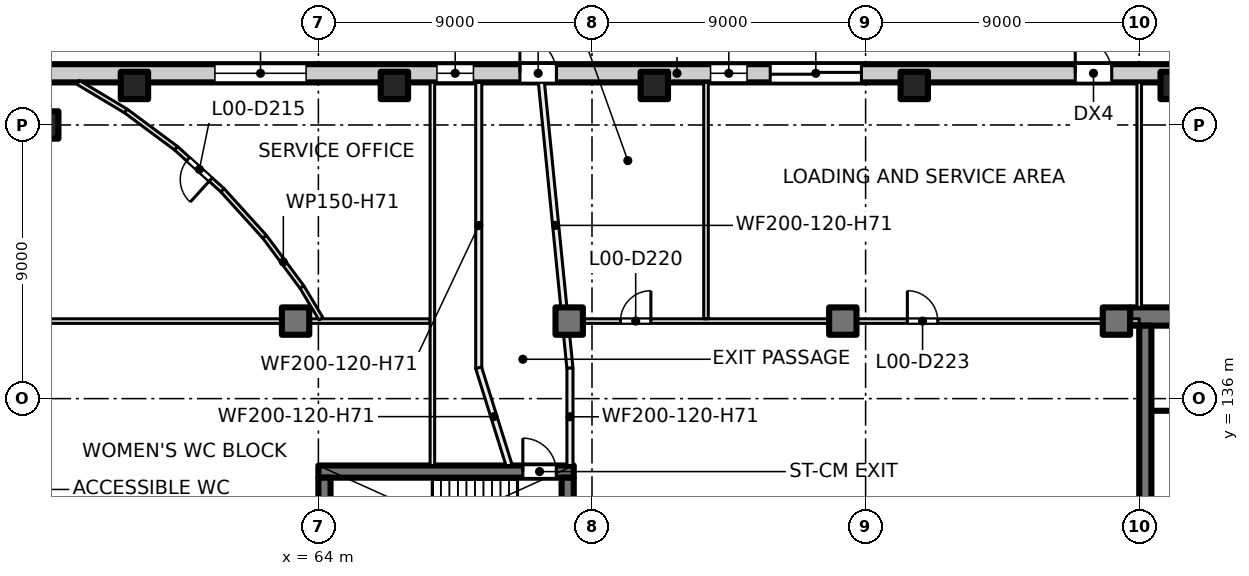
"""IFC4 building model, lengths in metres.
Left out: names, types, materials, properties, quantities, classifications, styles, units other than length and angle.
Written with IfcOpenShell. Run it as: python <this file> out.ifc"""

import sys

from ifc_helpers import new_model, si_unit, direction, frame, frame_2d, origin, origin_2d, place, context, subcontext, project, spatial, rectangle, extrude, element, fill, save


model = new_model("IFC4")
c1 = context("Model", 3, precision=1e-05, world=origin(), true_north=direction((0.0, 1.0)))
c2 = subcontext(c1, "Body", "Model", "MODEL_VIEW")
j1 = project(units=[si_unit("LENGTHUNIT", "METRE"), si_unit("PLANEANGLEUNIT", "RADIAN")], contexts=[c1])
p1 = place(None, origin())
s1 = spatial("IfcSite", under=j1, at=p1, CompositionType="ELEMENT")
p2 = place(p1, origin())
s2 = spatial("IfcBuilding", under=s1, at=p2, CompositionType="ELEMENT")
p3 = place(p2, origin())
s3 = spatial("IfcBuildingStorey", under=s2, at=p3, CompositionType="ELEMENT", Elevation=0.0)
for number, where, z_axis, x_axis in (
    (1, (55.0, 145.0, 0.0), (0.0, 0.0, 1.0), (1.0, 0.0, 0.0)),
    (2, (57.95, 146.3, 0.0), (0.0, 0.0, 1.0), (1.0, 0.0, 0.0)),
    (3, (66.5, 146.3, 0.0), (0.0, 0.0, 1.0), (1.0, 0.0, 0.0)),
    (4, (75.05, 146.3, 0.0), (0.0, 0.0, 1.0), (1.0, 0.0, 0.0)),
    (5, (83.6, 146.3, 0.0), (0.0, 0.0, 1.0), (1.0, 0.0, 0.0)),
    (6, (92.15, 146.3, 0.0), (0.0, 0.0, 1.0), (1.0, 0.0, 0.0)),
    (7, (63.25, 138.55, 0.0), (0.0, 0.0, 1.0), (1.0, 0.0, 0.0)),
    (8, (72.25, 138.55, 0.0), (0.0, 0.0, 1.0), (1.0, 0.0, 0.0)),
    (9, (81.25, 138.55, 0.0), (0.0, 0.0, 1.0), (1.0, 0.0, 0.0)),
    (10, (90.25, 138.55, 0.0), (0.0, 0.0, 1.0), (1.0, 0.0, 0.0)),
):
    element("IfcColumn", number, at=place(p3, frame(where, z_axis=z_axis, x_axis=x_axis)), inside=s3, PredefinedType="COLUMN", context=c2, shape_type="SweptSolid", body=[
        extrude(rectangle(XDim=0.9, YDim=0.9, at=origin_2d()), origin(), (0.0, 0.0, 1.0), 7.5),
    ])
p4 = place(p3, frame((99.6, 138.7, 0.0), z_axis=(0.0, 0.0, 1.0), x_axis=(-1.0, 0.0, 0.0)))
e11 = element("IfcWall", 11, at=p4, inside=s3, PredefinedType="SHEAR", context=c2, shape_type="SweptSolid", body=[
    extrude(rectangle(XDim=8.9, YDim=0.6, at=frame_2d((4.45, 0.0))), origin(), (0.0, 0.0, 1.0), 7.5),
])
p5 = place(p3, frame((91.2, 138.4, 0.0), z_axis=(0.0, 0.0, 1.0), x_axis=(0.0, -1.0, 0.0)))
e12 = element("IfcWall", 12, at=p5, inside=s3, PredefinedType="SHEAR", context=c2, shape_type="SweptSolid", body=[
    extrude(rectangle(XDim=8.6, YDim=0.4, at=frame_2d((4.3, 0.0))), origin(), (0.0, 0.0, 1.0), 7.5),
])
p6 = place(p3, frame((64.0, 133.6, 0.0), z_axis=(0.0, 0.0, 1.0), x_axis=(1.0, 0.0, 0.0)))
e13 = element("IfcWall", 13, at=p6, inside=s3, PredefinedType="SHEAR", context=c2, shape_type="SweptSolid", body=[
    extrude(rectangle(XDim=8.4, YDim=0.4, at=frame_2d((4.2, 0.0))), origin(), (0.0, 0.0, 1.0), 7.5),
])
p7 = place(p6, frame((6.725, 0.0, 0.0)))
e14 = element("IfcOpeningElement", 14, at=p7, cuts=e13, PredefinedType="OPENING", context=c2, shape_type="SweptSolid", body=[
    extrude(rectangle(XDim=1.1, YDim=2.1, at=frame_2d((0.55, 1.05))), frame((0.0, 0.21, 0.0), z_axis=(0.0, -1.0, 0.0), x_axis=(1.0, 0.0, 0.0)), (0.0, 0.0, 1.0), 0.42),
])
for number, where, z_axis, x_axis in (
    (15, (64.2, 130.4, 0.0), (0.0, 0.0, 1.0), (0.0, 1.0, 0.0)),
    (16, (72.2, 130.4, 0.0), (0.0, 0.0, 1.0), (0.0, 1.0, 0.0)),
):
    element("IfcWall", number, at=place(p3, frame(where, z_axis=z_axis, x_axis=x_axis)), inside=s3, PredefinedType="SHEAR", context=c2, shape_type="SweptSolid", body=[
        extrude(rectangle(XDim=3.0, YDim=0.4, at=frame_2d((1.5, 0.0))), origin(), (0.0, 0.0, 1.0), 7.5),
    ])
p8 = place(p3, frame((46.114, 146.7, 0.0), z_axis=(0.0, 0.0, 1.0), x_axis=(1.0, 0.0, 0.0)))
e17 = element("IfcWall", 17, at=p8, inside=s3, PredefinedType="SOLIDWALL", context=c2, shape_type="SweptSolid", body=[
    extrude(rectangle(XDim=59.364, YDim=0.6, at=frame_2d((29.682, 0.0))), origin(), (0.0, 0.0, 1.0), 7.1),
])
p9 = place(p8, frame((5.35, 0.0, 0.9)))
e18 = element("IfcOpeningElement", 18, at=p9, cuts=e17, PredefinedType="OPENING", context=c2, shape_type="SweptSolid", body=[
    extrude(rectangle(XDim=3.0, YDim=4.2, at=frame_2d((1.5, 2.1))), frame((0.0, 0.31, 0.0), z_axis=(0.0, -1.0, 0.0), x_axis=(1.0, 0.0, 0.0)), (0.0, 0.0, 1.0), 0.62),
])
p10 = place(p8, frame((14.483, 0.0, 0.9)))
e19 = element("IfcOpeningElement", 19, at=p10, cuts=e17, PredefinedType="OPENING", context=c2, shape_type="SweptSolid", body=[
    extrude(rectangle(XDim=3.0, YDim=4.2, at=frame_2d((1.5, 2.1))), frame((0.0, 0.31, 0.0), z_axis=(0.0, -1.0, 0.0), x_axis=(1.0, 0.0, 0.0)), (0.0, 0.0, 1.0), 0.62),
])
p11 = place(p8, frame((21.786, 0.0, 0.9)))
e20 = element("IfcOpeningElement", 20, at=p11, cuts=e17, PredefinedType="OPENING", context=c2, shape_type="SweptSolid", body=[
    extrude(rectangle(XDim=1.2, YDim=4.2, at=frame_2d((0.6, 2.1))), frame((0.0, 0.31, 0.0), z_axis=(0.0, -1.0, 0.0), x_axis=(1.0, 0.0, 0.0)), (0.0, 0.0, 1.0), 0.62),
])
p12 = place(p8, frame((24.516, 0.0, 0.0)))
e21 = element("IfcOpeningElement", 21, at=p12, cuts=e17, PredefinedType="OPENING", context=c2, shape_type="SweptSolid", body=[
    extrude(rectangle(XDim=1.2, YDim=2.4, at=frame_2d((0.6, 1.2))), frame((0.0, 0.31, 0.0), z_axis=(0.0, -1.0, 0.0), x_axis=(1.0, 0.0, 0.0)), (0.0, 0.0, 1.0), 0.62),
])
p13 = place(p8, frame((30.786, 0.0, 0.9)))
e22 = element("IfcOpeningElement", 22, at=p13, cuts=e17, PredefinedType="OPENING", context=c2, shape_type="SweptSolid", body=[
    extrude(rectangle(XDim=1.2, YDim=4.2, at=frame_2d((0.6, 2.1))), frame((0.0, 0.31, 0.0), z_axis=(0.0, -1.0, 0.0), x_axis=(1.0, 0.0, 0.0)), (0.0, 0.0, 1.0), 0.62),
])
p14 = place(p8, frame((32.749, 0.0, 0.0)))
e23 = element("IfcOpeningElement", 23, at=p14, cuts=e17, PredefinedType="OPENING", context=c2, shape_type="SweptSolid", body=[
    extrude(rectangle(XDim=3.0, YDim=3.0, at=frame_2d((1.5, 1.5))), frame((0.0, 0.31, 0.0), z_axis=(0.0, -1.0, 0.0), x_axis=(1.0, 0.0, 0.0)), (0.0, 0.0, 1.0), 0.62),
])
p15 = place(p8, frame((42.781, 0.0, 0.0)))
e24 = element("IfcOpeningElement", 24, at=p15, cuts=e17, PredefinedType="OPENING", context=c2, shape_type="SweptSolid", body=[
    extrude(rectangle(XDim=1.2, YDim=2.1, at=frame_2d((0.6, 1.05))), frame((0.0, 0.31, 0.0), z_axis=(0.0, -1.0, 0.0), x_axis=(1.0, 0.0, 0.0)), (0.0, 0.0, 1.0), 0.62),
])
p16 = place(p8, frame((46.748, 0.0, 0.9)))
e25 = element("IfcOpeningElement", 25, at=p16, cuts=e17, PredefinedType="OPENING", context=c2, shape_type="SweptSolid", body=[
    extrude(rectangle(XDim=3.0, YDim=4.2, at=frame_2d((1.5, 2.1))), frame((0.0, 0.31, 0.0), z_axis=(0.0, -1.0, 0.0), x_axis=(1.0, 0.0, 0.0)), (0.0, 0.0, 1.0), 0.62),
])
p17 = place(p8, frame((50.865, 0.0, 0.9)))
e26 = element("IfcOpeningElement", 26, at=p17, cuts=e17, PredefinedType="OPENING", context=c2, shape_type="SweptSolid", body=[
    extrude(rectangle(XDim=3.0, YDim=4.2, at=frame_2d((1.5, 2.1))), frame((0.0, 0.31, 0.0), z_axis=(0.0, -1.0, 0.0), x_axis=(1.0, 0.0, 0.0)), (0.0, 0.0, 1.0), 0.62),
])
p18 = place(p8, frame((56.481, 0.0, 0.0)))
e27 = element("IfcOpeningElement", 27, at=p18, cuts=e17, PredefinedType="OPENING", context=c2, shape_type="SweptSolid", body=[
    extrude(rectangle(XDim=1.2, YDim=2.4, at=frame_2d((0.6, 1.2))), frame((0.0, 0.31, 0.0), z_axis=(0.0, -1.0, 0.0), x_axis=(1.0, 0.0, 0.0)), (0.0, 0.0, 1.0), 0.62),
])
p19 = place(p3, frame((91.4, 135.6, 0.0), z_axis=(0.0, 0.0, 1.0), x_axis=(1.0, 0.0, 0.0)))
e28 = element("IfcWall", 28, at=p19, inside=s3, PredefinedType="PARTITIONING", context=c2, shape_type="SweptSolid", body=[
    extrude(rectangle(XDim=1.95, YDim=0.1, at=frame_2d((0.975, 0.0))), origin(), (0.0, 0.0, 1.0), 7.1),
])
p20 = place(p3, frame((54.325, 138.55, 0.0), z_axis=(0.0, 0.0, 1.0), x_axis=(1.0, 0.0, 0.0)))
e29 = element("IfcWall", 29, at=p20, inside=s3, PredefinedType="PARTITIONING", context=c2, shape_type="SweptSolid", body=[
    extrude(rectangle(XDim=13.35, YDim=0.15, at=frame_2d((6.675, 0.0))), origin(), (0.0, 0.0, 1.0), 7.1),
])
p21 = place(p3, frame((56.1, 146.4, 0.0), z_axis=(0.0, 0.0, 1.0), x_axis=(0.857728238456, -0.514103364076, 0.0)))
e30 = element("IfcWall", 30, at=p21, inside=s3, PredefinedType="PARTITIONING", context=c2, shape_type="SweptSolid", body=[
    extrude(rectangle(XDim=1.83, YDim=0.15, at=frame_2d((0.915, 0.0))), origin(), (0.0, 0.0, 1.0), 7.1),
])
p22 = place(p3, frame((57.664, 145.463, 0.0), z_axis=(0.0, 0.0, 1.0), x_axis=(0.80317638599, -0.595741297031, 0.0)))
e31 = element("IfcWall", 31, at=p22, inside=s3, PredefinedType="PARTITIONING", context=c2, shape_type="SweptSolid", body=[
    extrude(rectangle(XDim=2.068, YDim=0.15, at=frame_2d((1.034, 0.0))), origin(), (0.0, 0.0, 1.0), 7.1),
])
p23 = place(p3, frame((59.319, 144.235, 0.0), z_axis=(0.0, 0.0, 1.0), x_axis=(0.741242052621, -0.671237826278, 0.0)))
e32 = element("IfcWall", 32, at=p23, inside=s3, PredefinedType="PARTITIONING", context=c2, shape_type="SweptSolid", body=[
    extrude(rectangle(XDim=2.068, YDim=0.15, at=frame_2d((1.034, 0.0))), origin(), (0.0, 0.0, 1.0), 7.1),
])
p24 = place(p23, frame((0.534, 0.0, 0.0)))
e33 = element("IfcOpeningElement", 33, at=p24, cuts=e32, PredefinedType="OPENING", context=c2, shape_type="SweptSolid", body=[
    extrude(rectangle(XDim=1.0, YDim=2.1, at=frame_2d((0.5, 1.05))), frame((0.0, 0.085, 0.0), z_axis=(0.0, -1.0, 0.0), x_axis=(1.0, 0.0, 0.0)), (0.0, 0.0, 1.0), 0.17),
])
p25 = place(p3, frame((60.847, 142.852, 0.0), z_axis=(0.0, 0.0, 1.0), x_axis=(0.671237826278, -0.741242052621, 0.0)))
e34 = element("IfcWall", 34, at=p25, inside=s3, PredefinedType="PARTITIONING", context=c2, shape_type="SweptSolid", body=[
    extrude(rectangle(XDim=2.068, YDim=0.15, at=frame_2d((1.034, 0.0))), origin(), (0.0, 0.0, 1.0), 7.1),
])
p26 = place(p3, frame((62.231, 141.325, 0.0), z_axis=(0.0, 0.0, 1.0), x_axis=(0.595741297031, -0.80317638599, 0.0)))
e35 = element("IfcWall", 35, at=p26, inside=s3, PredefinedType="PARTITIONING", context=c2, shape_type="SweptSolid", body=[
    extrude(rectangle(XDim=2.068, YDim=0.15, at=frame_2d((1.034, 0.0))), origin(), (0.0, 0.0, 1.0), 7.1),
])
p27 = place(p3, frame((63.459, 139.67, 0.0), z_axis=(0.0, 0.0, 1.0), x_axis=(0.513906129706, -0.857846425563, 0.0)))
e36 = element("IfcWall", 36, at=p27, inside=s3, PredefinedType="PARTITIONING", context=c2, shape_type="SweptSolid", body=[
    extrude(rectangle(XDim=1.218, YDim=0.15, at=frame_2d((0.609, 0.0))), origin(), (0.0, 0.0, 1.0), 7.1),
])
p28 = place(p3, frame((67.75, 133.8, 0.0), z_axis=(0.0, 0.0, 1.0), x_axis=(0.0, 1.0, 0.0)))
e37 = element("IfcWall", 37, at=p28, inside=s3, PredefinedType="PARTITIONING", context=c2, shape_type="SweptSolid", body=[
    extrude(rectangle(XDim=12.6, YDim=0.15, at=frame_2d((6.3, 0.0))), origin(), (0.0, 0.0, 1.0), 7.1),
])
p29 = place(p3, frame((69.275, 136.985, 0.0), z_axis=(0.0, 0.0, 1.0), x_axis=(0.0, 1.0, 0.0)))
e38 = element("IfcWall", 38, at=p29, inside=s3, PredefinedType="PARTITIONING", context=c2, shape_type="SweptSolid", body=[
    extrude(rectangle(XDim=9.415, YDim=0.2, at=frame_2d((4.708, 0.0))), origin(), (0.0, 0.0, 1.0), 7.1),
])
p30 = place(p3, frame((69.27, 137.015, 0.0), z_axis=(0.0, 0.0, 1.0), x_axis=(0.298341026978, -0.954459339952, 0.0)))
e39 = element("IfcWall", 39, at=p30, inside=s3, PredefinedType="PARTITIONING", context=c2, shape_type="SweptSolid", body=[
    extrude(rectangle(XDim=3.368, YDim=0.2, at=frame_2d((1.684, 0.0))), origin(), (0.0, 0.0, 1.0), 7.1),
])
p31 = place(p3, frame((71.335, 146.4, 0.0), z_axis=(0.0, 0.0, 1.0), x_axis=(0.09944745439, -0.995042815066, 0.0)))
e40 = element("IfcWall", 40, at=p31, inside=s3, PredefinedType="PARTITIONING", context=c2, shape_type="SweptSolid", body=[
    extrude(rectangle(XDim=9.452, YDim=0.2, at=frame_2d((4.726, 0.0))), origin(), (0.0, 0.0, 1.0), 7.1),
])
p32 = place(p3, frame((72.22, 138.55, 0.0), z_axis=(0.0, 0.0, 1.0), x_axis=(1.0, 0.0, 0.0)))
e41 = element("IfcWall", 41, at=p32, inside=s3, PredefinedType="PARTITIONING", context=c2, shape_type="SweptSolid", body=[
    extrude(rectangle(XDim=18.78, YDim=0.15, at=frame_2d((9.39, 0.0))), origin(), (0.0, 0.0, 1.0), 7.1),
])
p33 = place(p32, frame((1.717, 0.0, 0.0)))
e42 = element("IfcOpeningElement", 42, at=p33, cuts=e41, PredefinedType="OPENING", context=c2, shape_type="SweptSolid", body=[
    extrude(rectangle(XDim=1.0, YDim=2.1, at=frame_2d((0.5, 1.05))), frame((0.0, 0.085, 0.0), z_axis=(0.0, -1.0, 0.0), x_axis=(1.0, 0.0, 0.0)), (0.0, 0.0, 1.0), 0.17),
])
p34 = place(p32, frame((11.153, 0.0, 0.0)))
e43 = element("IfcOpeningElement", 43, at=p34, cuts=e41, PredefinedType="OPENING", context=c2, shape_type="SweptSolid", body=[
    extrude(rectangle(XDim=1.0, YDim=2.1, at=frame_2d((0.5, 1.05))), frame((0.0, 0.085, 0.0), z_axis=(0.0, -1.0, 0.0), x_axis=(1.0, 0.0, 0.0)), (0.0, 0.0, 1.0), 0.17),
])
p35 = place(p3, frame((72.275, 133.8, 0.0), z_axis=(0.0, 0.0, 1.0), x_axis=(0.0, 1.0, 0.0)))
e44 = element("IfcWall", 44, at=p35, inside=s3, PredefinedType="PARTITIONING", context=c2, shape_type="SweptSolid", body=[
    extrude(rectangle(XDim=3.205, YDim=0.2, at=frame_2d((1.603, 0.0))), origin(), (0.0, 0.0, 1.0), 7.1),
])
p36 = place(p3, frame((76.75, 138.625, 0.0), z_axis=(0.0, 0.0, 1.0), x_axis=(0.0, 1.0, 0.0)))
e45 = element("IfcWall", 45, at=p36, inside=s3, PredefinedType="PARTITIONING", context=c2, shape_type="SweptSolid", body=[
    extrude(rectangle(XDim=7.775, YDim=0.15, at=frame_2d((3.887, 0.0))), origin(), (0.0, 0.0, 1.0), 7.1),
])
p37 = place(p3, frame((91.0, 139.0, 0.0), z_axis=(0.0, 0.0, 1.0), x_axis=(0.0, 1.0, 0.0)))
e46 = element("IfcWall", 46, at=p37, inside=s3, PredefinedType="PARTITIONING", context=c2, shape_type="SweptSolid", body=[
    extrude(rectangle(XDim=7.4, YDim=0.15, at=frame_2d((3.7, 0.0))), origin(), (0.0, 0.0, 1.0), 7.1),
])
p38 = place(p10, origin())
e47 = element("IfcWindow", 47, at=p38, inside=s3, PartitioningType="SINGLE_PANEL", PredefinedType="WINDOW", context=c2, shape_type="SweptSolid", body=[
    extrude(rectangle(XDim=3.0, YDim=4.2, at=frame_2d((1.5, 2.1))), frame((0.0, 0.03, 0.0), z_axis=(0.0, -1.0, 0.0), x_axis=(1.0, 0.0, 0.0)), (0.0, 0.0, 1.0), 0.06),
])
fill(e19, e47)
p39 = place(p11, origin())
e48 = element("IfcWindow", 48, at=p39, inside=s3, PartitioningType="SINGLE_PANEL", PredefinedType="WINDOW", context=c2, shape_type="SweptSolid", body=[
    extrude(rectangle(XDim=1.2, YDim=4.2, at=frame_2d((0.6, 2.1))), frame((0.0, 0.03, 0.0), z_axis=(0.0, -1.0, 0.0), x_axis=(1.0, 0.0, 0.0)), (0.0, 0.0, 1.0), 0.06),
])
fill(e20, e48)
p40 = place(p12, origin())
e49 = element("IfcDoor", 49, at=p40, inside=s3, OperationType="SINGLE_SWING_LEFT", PredefinedType="DOOR", context=c2, shape_type="SweptSolid", body=[
    extrude(rectangle(XDim=1.2, YDim=2.4, at=frame_2d((0.6, 1.2))), frame((0.0, 0.025, 0.0), z_axis=(0.0, -1.0, 0.0), x_axis=(1.0, 0.0, 0.0)), (0.0, 0.0, 1.0), 0.05),
])
fill(e21, e49)
p41 = place(p13, origin())
e50 = element("IfcWindow", 50, at=p41, inside=s3, PartitioningType="SINGLE_PANEL", PredefinedType="WINDOW", context=c2, shape_type="SweptSolid", body=[
    extrude(rectangle(XDim=1.2, YDim=4.2, at=frame_2d((0.6, 2.1))), frame((0.0, 0.03, 0.0), z_axis=(0.0, -1.0, 0.0), x_axis=(1.0, 0.0, 0.0)), (0.0, 0.0, 1.0), 0.06),
])
fill(e22, e50)
p42 = place(p14, origin())
e51 = element("IfcDoor", 51, at=p42, inside=s3, OperationType="SLIDING_TO_LEFT", PredefinedType="DOOR", context=c2, shape_type="SweptSolid", body=[
    extrude(rectangle(XDim=3.0, YDim=3.0, at=frame_2d((1.5, 1.5))), frame((0.0, 0.025, 0.0), z_axis=(0.0, -1.0, 0.0), x_axis=(1.0, 0.0, 0.0)), (0.0, 0.0, 1.0), 0.05),
])
fill(e23, e51)
p43 = place(p15, origin())
e52 = element("IfcDoor", 52, at=p43, inside=s3, OperationType="SINGLE_SWING_RIGHT", PredefinedType="DOOR", context=c2, shape_type="SweptSolid", body=[
    extrude(rectangle(XDim=1.2, YDim=2.1, at=frame_2d((0.6, 1.05))), frame((0.0, 0.025, 0.0), z_axis=(0.0, -1.0, 0.0), x_axis=(1.0, 0.0, 0.0)), (0.0, 0.0, 1.0), 0.05),
])
fill(e24, e52)
p44 = place(p7, origin())
e53 = element("IfcDoor", 53, at=p44, inside=s3, OperationType="SINGLE_SWING_LEFT", PredefinedType="DOOR", context=c2, shape_type="SweptSolid", body=[
    extrude(rectangle(XDim=1.1, YDim=2.1, at=frame_2d((0.55, 1.05))), frame((0.0, 0.025, 0.0), z_axis=(0.0, -1.0, 0.0), x_axis=(1.0, 0.0, 0.0)), (0.0, 0.0, 1.0), 0.05),
])
fill(e14, e53)
p45 = place(p24, origin())
e54 = element("IfcDoor", 54, at=p45, inside=s3, OperationType="SINGLE_SWING_RIGHT", PredefinedType="DOOR", context=c2, shape_type="SweptSolid", body=[
    extrude(rectangle(XDim=1.0, YDim=2.1, at=frame_2d((0.5, 1.05))), frame((0.0, 0.025, 0.0), z_axis=(0.0, -1.0, 0.0), x_axis=(1.0, 0.0, 0.0)), (0.0, 0.0, 1.0), 0.05),
])
fill(e33, e54)
p46 = place(p33, origin())
e55 = element("IfcDoor", 55, at=p46, inside=s3, OperationType="SINGLE_SWING_RIGHT", PredefinedType="DOOR", context=c2, shape_type="SweptSolid", body=[
    extrude(rectangle(XDim=1.0, YDim=2.1, at=frame_2d((0.5, 1.05))), frame((0.0, 0.025, 0.0), z_axis=(0.0, -1.0, 0.0), x_axis=(1.0, 0.0, 0.0)), (0.0, 0.0, 1.0), 0.05),
])
fill(e42, e55)
p47 = place(p34, origin())
e56 = element("IfcDoor", 56, at=p47, inside=s3, OperationType="SINGLE_SWING_LEFT", PredefinedType="DOOR", context=c2, shape_type="SweptSolid", body=[
    extrude(rectangle(XDim=1.0, YDim=2.1, at=frame_2d((0.5, 1.05))), frame((0.0, 0.025, 0.0), z_axis=(0.0, -1.0, 0.0), x_axis=(1.0, 0.0, 0.0)), (0.0, 0.0, 1.0), 0.05),
])
fill(e43, e56)
save(model, sys.argv[1])
